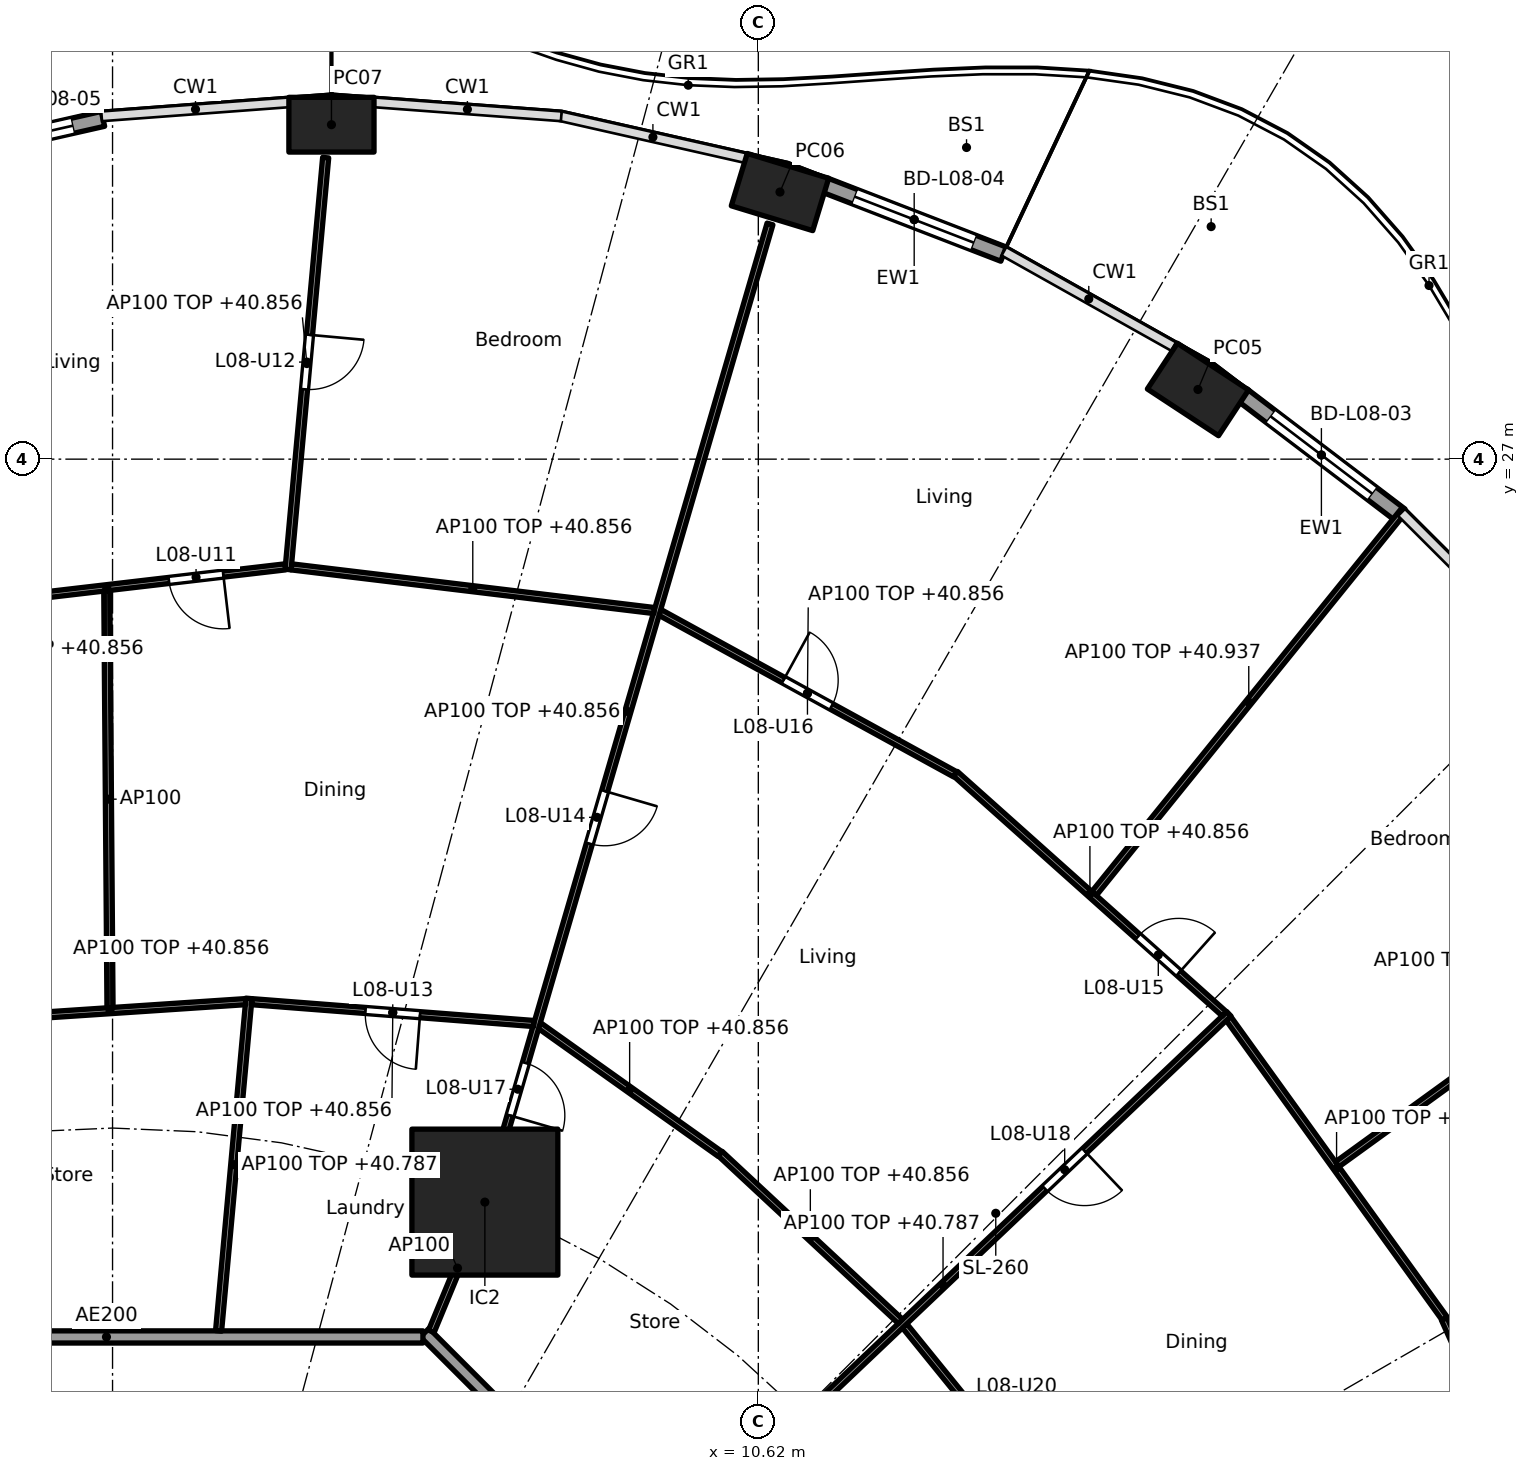
"""IFC4 building model, lengths in metres.
Left out: names, types, materials, properties, quantities, classifications, styles, units other than length and angle.
Written with IfcOpenShell. Run it as: python <this file> out.ifc"""

import sys

from ifc_helpers import new_model, si_unit, direction, frame, frame_2d, origin, origin_2d, place, context, subcontext, project, spatial, rectangle, hollow_rectangle, extrude, element, fill, save


model = new_model("IFC4")
c1 = context("Model", 3, precision=1e-05, world=origin(), true_north=direction((0.0, 1.0)))
c2 = subcontext(c1, "Body", "Model", "MODEL_VIEW")
j1 = project(units=[si_unit("LENGTHUNIT", "METRE"), si_unit("PLANEANGLEUNIT", "RADIAN")], contexts=[c1])
p1 = place(None, origin())
s1 = spatial("IfcSite", under=j1, at=p1, CompositionType="ELEMENT")
p2 = place(p1, origin())
s2 = spatial("IfcBuilding", under=s1, at=p2, CompositionType="ELEMENT")
p3 = place(p2, frame((0.0, 0.0, 38.1)))
s3 = spatial("IfcBuildingStorey", under=s2, at=p3, CompositionType="ELEMENT", Elevation=38.1)
for number, where, z_axis, x_axis in (
    (1, (17.85, 28.146, 0.0), (0.0, 0.0, 1.0), (-0.836, 0.549, 0.0)),
    (2, (10.976, 31.393, 0.0), (0.0, 0.0, 1.0), (-0.957, 0.292, 0.0)),
    (3, (3.6, 32.5, 0.0), (0.0, 0.0, 1.0), (-1.0, 0.0, 0.0)),
):
    element("IfcColumn", number, at=place(p3, frame(where, z_axis=z_axis, x_axis=x_axis)), inside=s3, PredefinedType="COLUMN", context=c2, shape_type="SweptSolid", body=[
        extrude(hollow_rectangle(XDim=1.4, YDim=0.9, WallThickness=0.05, at=origin_2d()), origin(), (0.0, 0.0, 1.0), 3.7),
    ])
p4 = place(p3, frame((6.123, 14.782, 0.0), z_axis=(0.0, 0.0, 1.0), x_axis=(1.0, 0.0, 0.0)))
e4 = element("IfcColumn", 4, at=p4, inside=s3, PredefinedType="COLUMN", context=c2, shape_type="SweptSolid", body=[
    extrude(rectangle(XDim=2.4, YDim=2.4, at=origin_2d()), origin(), (0.0, 0.0, 1.0), 3.7),
])
p5 = place(p3, frame((18.582, 28.056, 0.0), z_axis=(0.0, 0.0, 1.0), x_axis=(0.796022293214, -0.605267303517, 0.0)))
e5 = element("IfcWall", 5, at=p5, inside=s3, PredefinedType="SOLIDWALL", context=c2, shape_type="SweptSolid", body=[
    extrude(rectangle(XDim=3.262, YDim=0.25, at=frame_2d((1.631, 0.0))), origin(), (0.0, 0.0, 1.0), 3.44),
])
p6 = place(p5, frame((0.581, 0.0, 0.0)))
e6 = element("IfcOpeningElement", 6, at=p6, cuts=e5, PredefinedType="OPENING", context=c2, shape_type="SweptSolid", body=[
    extrude(rectangle(XDim=2.1, YDim=2.4, at=frame_2d((1.05, 1.2))), frame((0.0, 0.135, 0.0), z_axis=(0.0, -1.0, 0.0), x_axis=(1.0, 0.0, 0.0)), (0.0, 0.0, 1.0), 0.27),
])
p7 = place(p3, frame((11.714, 31.507, 0.0), z_axis=(0.0, 0.0, 1.0), x_axis=(0.932809381943, -0.360370166577, 0.0)))
e7 = element("IfcWall", 7, at=p7, inside=s3, PredefinedType="SOLIDWALL", context=c2, shape_type="SweptSolid", body=[
    extrude(rectangle(XDim=3.151, YDim=0.25, at=frame_2d((1.575, 0.0))), origin(), (0.0, 0.0, 1.0), 3.44),
])
p8 = place(p7, frame((0.525, 0.0, 0.0)))
e8 = element("IfcOpeningElement", 8, at=p8, cuts=e7, PredefinedType="OPENING", context=c2, shape_type="SweptSolid", body=[
    extrude(rectangle(XDim=2.1, YDim=2.4, at=frame_2d((1.05, 1.2))), frame((0.0, 0.135, 0.0), z_axis=(0.0, -1.0, 0.0), x_axis=(1.0, 0.0, 0.0)), (0.0, 0.0, 1.0), 0.27),
])
p9 = place(p3, frame((-3.195, 31.908, 0.0), z_axis=(0.0, 0.0, 1.0), x_axis=(0.975331134677, 0.220746863466, 0.0)))
e9 = element("IfcWall", 9, at=p9, inside=s3, PredefinedType="SOLIDWALL", context=c2, shape_type="SweptSolid", body=[
    extrude(rectangle(XDim=3.115, YDim=0.25, at=frame_2d((1.557, 0.0))), origin(), (0.0, 0.0, 1.0), 3.44),
])
p10 = place(p9, frame((0.507, 0.0, 0.0)))
e10 = element("IfcOpeningElement", 10, at=p10, cuts=e9, PredefinedType="OPENING", context=c2, shape_type="SweptSolid", body=[
    extrude(rectangle(XDim=2.1, YDim=2.4, at=frame_2d((1.05, 1.2))), frame((0.0, 0.135, 0.0), z_axis=(0.0, -1.0, 0.0), x_axis=(1.0, 0.0, 0.0)), (0.0, 0.0, 1.0), 0.27),
])
p11 = place(p3, frame((12.635, 5.134, 0.0), z_axis=(0.0, 0.0, 1.0), x_axis=(-0.707106781187, 0.707106781187, 0.0)))
e11 = element("IfcWall", 11, at=p11, inside=s3, PredefinedType="PARTITIONING", context=c2, shape_type="SweptSolid", body=[
    extrude(rectangle(XDim=10.609, YDim=0.2, at=frame_2d((5.305, 0.0))), origin(), (0.0, 0.0, 1.0), 3.44),
])
p12 = place(p3, frame((5.104, 12.565, 0.0), z_axis=(0.0, 0.0, 1.0), x_axis=(-1.0, 0.0, 0.0)))
e12 = element("IfcWall", 12, at=p12, inside=s3, PredefinedType="PARTITIONING", context=c2, shape_type="SweptSolid", body=[
    extrude(rectangle(XDim=10.409, YDim=0.2, at=frame_2d((5.205, 0.0))), origin(), (0.0, 0.0, 1.0), 3.44),
])
p13 = place(p3, frame((24.273, 7.584, 0.0), z_axis=(0.0, 0.0, 1.0), x_axis=(-0.410201529109, 0.911994904326, 0.0)))
e13 = element("IfcWall", 13, at=p13, inside=s3, PredefinedType="PARTITIONING", context=c2, shape_type="SweptSolid", body=[
    extrude(rectangle(XDim=5.787, YDim=0.1, at=frame_2d((2.894, 0.0))), origin(), (0.0, 0.0, 1.0), 2.756),
])
p14 = place(p13, frame((2.444, 0.0, 0.0)))
e14 = element("IfcOpeningElement", 14, at=p14, cuts=e13, PredefinedType="OPENING", context=c2, shape_type="SweptSolid", body=[
    extrude(rectangle(XDim=0.9, YDim=2.1, at=frame_2d((0.45, 1.05))), frame((0.0, 0.06, 0.0), z_axis=(0.0, -1.0, 0.0), x_axis=(1.0, 0.0, 0.0)), (0.0, 0.0, 1.0), 0.12),
])
p15 = place(p3, frame((15.614, 9.559, 0.0), z_axis=(0.0, 0.0, 1.0), x_axis=(-0.63012473344, 0.776493928056, 0.0)))
e15 = element("IfcWall", 15, at=p15, inside=s3, PredefinedType="PARTITIONING", context=c2, shape_type="SweptSolid", body=[
    extrude(rectangle(XDim=4.106, YDim=0.1, at=frame_2d((2.053, 0.0))), origin(), (0.0, 0.0, 1.0), 2.756),
])
p16 = place(p15, frame((1.628, 0.0, 0.0)))
e16 = element("IfcOpeningElement", 16, at=p16, cuts=e15, PredefinedType="OPENING", context=c2, shape_type="SweptSolid", body=[
    extrude(rectangle(XDim=0.9, YDim=2.1, at=frame_2d((0.45, 1.05))), frame((0.0, 0.06, 0.0), z_axis=(0.0, -1.0, 0.0), x_axis=(1.0, 0.0, 0.0)), (0.0, 0.0, 1.0), 0.12),
])
p17 = place(p3, frame((21.908, 12.866, 0.0), z_axis=(0.0, 0.0, 1.0), x_axis=(-0.584558392935, 0.811351640936, 0.0)))
e17 = element("IfcWall", 17, at=p17, inside=s3, PredefinedType="PARTITIONING", context=c2, shape_type="SweptSolid", body=[
    extrude(rectangle(XDim=6.084, YDim=0.1, at=frame_2d((3.042, 0.0))), origin(), (0.0, 0.0, 1.0), 2.756),
])
p18 = place(p3, frame((20.141, 15.405, 0.0), z_axis=(0.0, 0.0, 1.0), x_axis=(0.809834895779, 0.58665785734, 0.0)))
e18 = element("IfcWall", 18, at=p18, inside=s3, PredefinedType="PARTITIONING", context=c2, shape_type="SweptSolid", body=[
    extrude(rectangle(XDim=7.945, YDim=0.1, at=frame_2d((3.973, 0.0))), origin(), (0.0, 0.0, 1.0), 2.837),
])
p19 = place(p3, frame((8.957, 8.953, 0.0), z_axis=(0.0, 0.0, 1.0), x_axis=(0.725250022034, 0.688485588476, 0.0)))
e19 = element("IfcWall", 19, at=p19, inside=s3, PredefinedType="PARTITIONING", context=c2, shape_type="SweptSolid", body=[
    extrude(rectangle(XDim=12.963, YDim=0.1, at=frame_2d((6.481, 0.0))), origin(), (0.0, 0.0, 1.0), 2.687),
])
p20 = place(p19, frame((8.79, 0.0, 0.0)))
e20 = element("IfcOpeningElement", 20, at=p20, cuts=e19, PredefinedType="OPENING", context=c2, shape_type="SweptSolid", body=[
    extrude(rectangle(XDim=0.9, YDim=2.1, at=frame_2d((0.45, 1.05))), frame((0.0, 0.06, 0.0), z_axis=(0.0, -1.0, 0.0), x_axis=(1.0, 0.0, 0.0)), (0.0, 0.0, 1.0), 0.12),
])
p21 = place(p3, frame((12.958, 12.82, 0.0), z_axis=(0.0, 0.0, 1.0), x_axis=(-0.732028724098, 0.681273768096, 0.0)))
e21 = element("IfcWall", 21, at=p21, inside=s3, PredefinedType="PARTITIONING", context=c2, shape_type="SweptSolid", body=[
    extrude(rectangle(XDim=4.05, YDim=0.1, at=frame_2d((2.025, 0.0))), origin(), (0.0, 0.0, 1.0), 2.756),
])
p22 = place(p3, frame((18.285, 17.877, 0.0), z_axis=(0.0, 0.0, 1.0), x_axis=(-0.745812746724, 0.666155647596, 0.0)))
e22 = element("IfcWall", 22, at=p22, inside=s3, PredefinedType="PARTITIONING", context=c2, shape_type="SweptSolid", body=[
    extrude(rectangle(XDim=5.931, YDim=0.1, at=frame_2d((2.965, 0.0))), origin(), (0.0, 0.0, 1.0), 2.756),
])
p23 = place(p22, frame((1.008, 0.0, 0.0)))
e23 = element("IfcOpeningElement", 23, at=p23, cuts=e22, PredefinedType="OPENING", context=c2, shape_type="SweptSolid", body=[
    extrude(rectangle(XDim=0.9, YDim=2.1, at=frame_2d((0.45, 1.05))), frame((0.0, 0.06, 0.0), z_axis=(0.0, -1.0, 0.0), x_axis=(1.0, 0.0, 0.0)), (0.0, 0.0, 1.0), 0.12),
])
p24 = place(p3, frame((16.142, 19.858, 0.0), z_axis=(0.0, 0.0, 1.0), x_axis=(0.628738066508, 0.777617157555, 0.0)))
e24 = element("IfcWall", 24, at=p24, inside=s3, PredefinedType="PARTITIONING", context=c2, shape_type="SweptSolid", body=[
    extrude(rectangle(XDim=8.091, YDim=0.1, at=frame_2d((4.045, 0.0))), origin(), (0.0, 0.0, 1.0), 2.837),
])
p25 = place(p3, frame((9.989, 15.574, 0.0), z_axis=(0.0, 0.0, 1.0), x_axis=(-0.81494477814, 0.57953861699, 0.0)))
e25 = element("IfcWall", 25, at=p25, inside=s3, PredefinedType="PARTITIONING", context=c2, shape_type="SweptSolid", body=[
    extrude(rectangle(XDim=3.644, YDim=0.1, at=frame_2d((1.822, 0.0))), origin(), (0.0, 0.0, 1.0), 2.756),
])
p26 = place(p3, frame((13.855, 21.818, 0.0), z_axis=(0.0, 0.0, 1.0), x_axis=(-0.876794415294, 0.480865421203, 0.0)))
e26 = element("IfcWall", 26, at=p26, inside=s3, PredefinedType="PARTITIONING", context=c2, shape_type="SweptSolid", body=[
    extrude(rectangle(XDim=5.536, YDim=0.1, at=frame_2d((2.768, 0.0))), origin(), (0.0, 0.0, 1.0), 2.756),
])
p27 = place(p26, frame((2.318, 0.0, 0.0)))
e27 = element("IfcOpeningElement", 27, at=p27, cuts=e26, PredefinedType="OPENING", context=c2, shape_type="SweptSolid", body=[
    extrude(rectangle(XDim=0.9, YDim=2.1, at=frame_2d((0.45, 1.05))), frame((0.0, 0.06, 0.0), z_axis=(0.0, -1.0, 0.0), x_axis=(1.0, 0.0, 0.0)), (0.0, 0.0, 1.0), 0.12),
])
p28 = place(p3, frame((5.243, 12.657, 0.0), z_axis=(0.0, 0.0, 1.0), x_axis=(0.382719158442, 0.923864733477, 0.0)))
e28 = element("IfcWall", 28, at=p28, inside=s3, PredefinedType="PARTITIONING", context=c2, shape_type="SweptSolid", body=[
    extrude(rectangle(XDim=2.25, YDim=0.1, at=frame_2d((1.125, 0.0))), origin(), (0.0, 0.0, 1.0), 3.44),
])
p29 = place(p3, frame((6.137, 14.83, 0.0), z_axis=(0.0, 0.0, 1.0), x_axis=(0.27985745069, 0.960041565399, 0.0)))
e29 = element("IfcWall", 29, at=p29, inside=s3, PredefinedType="PARTITIONING", context=c2, shape_type="SweptSolid", body=[
    extrude(rectangle(XDim=16.705, YDim=0.1, at=frame_2d((8.353, 0.0))), origin(), (0.0, 0.0, 1.0), 2.756),
])
p30 = place(p29, frame((6.091, 0.0, 0.0)))
e30 = element("IfcOpeningElement", 30, at=p30, cuts=e29, PredefinedType="OPENING", context=c2, shape_type="SweptSolid", body=[
    extrude(rectangle(XDim=0.9, YDim=2.1, at=frame_2d((0.45, 1.05))), frame((0.0, 0.06, 0.0), z_axis=(0.0, -1.0, 0.0), x_axis=(1.0, 0.0, 0.0)), (0.0, 0.0, 1.0), 0.12),
])
p31 = place(p29, frame((1.434, 0.0, 0.0)))
e31 = element("IfcOpeningElement", 31, at=p31, cuts=e29, PredefinedType="OPENING", context=c2, shape_type="SweptSolid", body=[
    extrude(rectangle(XDim=0.9, YDim=2.1, at=frame_2d((0.45, 1.05))), frame((0.0, 0.06, 0.0), z_axis=(0.0, -1.0, 0.0), x_axis=(1.0, 0.0, 0.0)), (0.0, 0.0, 1.0), 0.12),
])
p32 = place(p3, frame((6.928, 17.719, 0.0), z_axis=(0.0, 0.0, 1.0), x_axis=(-0.997017959142, 0.077169872028, 0.0)))
e32 = element("IfcWall", 32, at=p32, inside=s3, PredefinedType="PARTITIONING", context=c2, shape_type="SweptSolid", body=[
    extrude(rectangle(XDim=4.654, YDim=0.1, at=frame_2d((2.327, 0.0))), origin(), (0.0, 0.0, 1.0), 2.756),
])
p33 = place(p32, frame((1.877, 0.0, 0.0)))
e33 = element("IfcOpeningElement", 33, at=p33, cuts=e32, PredefinedType="OPENING", context=c2, shape_type="SweptSolid", body=[
    extrude(rectangle(XDim=0.9, YDim=2.1, at=frame_2d((0.45, 1.05))), frame((0.0, 0.06, 0.0), z_axis=(0.0, -1.0, 0.0), x_axis=(1.0, 0.0, 0.0)), (0.0, 0.0, 1.0), 0.12),
])
p34 = place(p3, frame((8.907, 24.51, 0.0), z_axis=(0.0, 0.0, 1.0), x_axis=(-0.992836798252, 0.119478416615, 0.0)))
e34 = element("IfcWall", 34, at=p34, inside=s3, PredefinedType="PARTITIONING", context=c2, shape_type="SweptSolid", body=[
    extrude(rectangle(XDim=6.01, YDim=0.1, at=frame_2d((3.005, 0.0))), origin(), (0.0, 0.0, 1.0), 2.756),
])
p35 = place(p3, frame((1.744, 12.664, 0.0), z_axis=(0.0, 0.0, 1.0), x_axis=(0.090888552747, 0.995861070119, 0.0)))
e35 = element("IfcWall", 35, at=p35, inside=s3, PredefinedType="PARTITIONING", context=c2, shape_type="SweptSolid", body=[
    extrude(rectangle(XDim=5.49, YDim=0.1, at=frame_2d((2.745, 0.0))), origin(), (0.0, 0.0, 1.0), 2.687),
])
p36 = place(p3, frame((2.188, 18.079, 0.0), z_axis=(0.0, 0.0, 1.0), x_axis=(-0.997791437766, -0.066424744789, 0.0)))
e36 = element("IfcWall", 36, at=p36, inside=s3, PredefinedType="PARTITIONING", context=c2, shape_type="SweptSolid", body=[
    extrude(rectangle(XDim=4.469, YDim=0.1, at=frame_2d((2.235, 0.0))), origin(), (0.0, 0.0, 1.0), 2.756),
])
p37 = place(p3, frame((2.887, 25.185, 0.0), z_axis=(0.0, 0.0, 1.0), x_axis=(0.090885272046, 0.995861369531, 0.0)))
e37 = element("IfcWall", 37, at=p37, inside=s3, PredefinedType="PARTITIONING", context=c2, shape_type="SweptSolid", body=[
    extrude(rectangle(XDim=6.802, YDim=0.1, at=frame_2d((3.401, 0.0))), origin(), (0.0, 0.0, 1.0), 2.756),
])
p38 = place(p37, frame((2.976, 0.0, 0.0)))
e38 = element("IfcOpeningElement", 38, at=p38, cuts=e37, PredefinedType="OPENING", context=c2, shape_type="SweptSolid", body=[
    extrude(rectangle(XDim=0.9, YDim=2.1, at=frame_2d((0.45, 1.05))), frame((0.0, 0.06, 0.0), z_axis=(0.0, -1.0, 0.0), x_axis=(1.0, 0.0, 0.0)), (0.0, 0.0, 1.0), 0.12),
])
p39 = place(p3, frame((2.842, 25.229, 0.0), z_axis=(0.0, 0.0, 1.0), x_axis=(-0.993255612046, -0.115945198862, 0.0)))
e39 = element("IfcWall", 39, at=p39, inside=s3, PredefinedType="PARTITIONING", context=c2, shape_type="SweptSolid", body=[
    extrude(rectangle(XDim=5.913, YDim=0.1, at=frame_2d((2.956, 0.0))), origin(), (0.0, 0.0, 1.0), 2.756),
])
p40 = place(p39, frame((1.028, 0.0, 0.0)))
e40 = element("IfcOpeningElement", 40, at=p40, cuts=e39, PredefinedType="OPENING", context=c2, shape_type="SweptSolid", body=[
    extrude(rectangle(XDim=0.9, YDim=2.1, at=frame_2d((0.45, 1.05))), frame((0.0, 0.06, 0.0), z_axis=(0.0, -1.0, 0.0), x_axis=(1.0, 0.0, 0.0)), (0.0, 0.0, 1.0), 0.12),
])
p41 = place(p3, frame((-0.042, 17.98, 0.0), z_axis=(0.0, 0.0, 1.0), x_axis=(-0.007692080119, 0.999970415514, 0.0)))
e41 = element("IfcWall", 41, at=p41, inside=s3, PredefinedType="PARTITIONING", context=c2, shape_type="SweptSolid", body=[
    extrude(rectangle(XDim=6.856, YDim=0.1, at=frame_2d((3.428, 0.0))), origin(), (0.0, 0.0, 1.0), 3.44),
])
p42 = place(p6, origin())
e42 = element("IfcDoor", 42, at=p42, inside=s3, OperationType="SLIDING_TO_LEFT", PredefinedType="DOOR", context=c2, shape_type="SweptSolid", body=[
    extrude(rectangle(XDim=2.1, YDim=2.4, at=frame_2d((1.05, 1.2))), frame((0.0, 0.025, 0.0), z_axis=(0.0, -1.0, 0.0), x_axis=(1.0, 0.0, 0.0)), (0.0, 0.0, 1.0), 0.05),
])
fill(e6, e42)
p43 = place(p8, origin())
e43 = element("IfcDoor", 43, at=p43, inside=s3, OperationType="SLIDING_TO_LEFT", PredefinedType="DOOR", context=c2, shape_type="SweptSolid", body=[
    extrude(rectangle(XDim=2.1, YDim=2.4, at=frame_2d((1.05, 1.2))), frame((0.0, 0.025, 0.0), z_axis=(0.0, -1.0, 0.0), x_axis=(1.0, 0.0, 0.0)), (0.0, 0.0, 1.0), 0.05),
])
fill(e8, e43)
p44 = place(p10, origin())
e44 = element("IfcDoor", 44, at=p44, inside=s3, OperationType="SLIDING_TO_LEFT", PredefinedType="DOOR", context=c2, shape_type="SweptSolid", body=[
    extrude(rectangle(XDim=2.1, YDim=2.4, at=frame_2d((1.05, 1.2))), frame((0.0, 0.025, 0.0), z_axis=(0.0, -1.0, 0.0), x_axis=(1.0, 0.0, 0.0)), (0.0, 0.0, 1.0), 0.05),
])
fill(e10, e44)
p45 = place(p40, origin())
e45 = element("IfcDoor", 45, at=p45, inside=s3, OperationType="SINGLE_SWING_LEFT", PredefinedType="DOOR", context=c2, shape_type="SweptSolid", body=[
    extrude(rectangle(XDim=0.9, YDim=2.1, at=frame_2d((0.45, 1.05))), frame((0.0, 0.025, 0.0), z_axis=(0.0, -1.0, 0.0), x_axis=(1.0, 0.0, 0.0)), (0.0, 0.0, 1.0), 0.05),
])
fill(e40, e45)
p46 = place(p38, frame((0.9, 0.0, 0.0), x_axis=(-1.0, 0.0, 0.0)))
e46 = element("IfcDoor", 46, at=p46, inside=s3, OperationType="SINGLE_SWING_LEFT", PredefinedType="DOOR", context=c2, shape_type="SweptSolid", body=[
    extrude(rectangle(XDim=0.9, YDim=2.1, at=frame_2d((0.45, 1.05))), frame((0.0, 0.025, 0.0), z_axis=(0.0, -1.0, 0.0), x_axis=(1.0, 0.0, 0.0)), (0.0, 0.0, 1.0), 0.05),
])
fill(e38, e46)
p47 = place(p33, origin())
e47 = element("IfcDoor", 47, at=p47, inside=s3, OperationType="SINGLE_SWING_LEFT", PredefinedType="DOOR", context=c2, shape_type="SweptSolid", body=[
    extrude(rectangle(XDim=0.9, YDim=2.1, at=frame_2d((0.45, 1.05))), frame((0.0, 0.025, 0.0), z_axis=(0.0, -1.0, 0.0), x_axis=(1.0, 0.0, 0.0)), (0.0, 0.0, 1.0), 0.05),
])
fill(e33, e47)
p48 = place(p30, frame((0.9, 0.0, 0.0), x_axis=(-1.0, 0.0, 0.0)))
e48 = element("IfcDoor", 48, at=p48, inside=s3, OperationType="SINGLE_SWING_LEFT", PredefinedType="DOOR", context=c2, shape_type="SweptSolid", body=[
    extrude(rectangle(XDim=0.9, YDim=2.1, at=frame_2d((0.45, 1.05))), frame((0.0, 0.025, 0.0), z_axis=(0.0, -1.0, 0.0), x_axis=(1.0, 0.0, 0.0)), (0.0, 0.0, 1.0), 0.05),
])
fill(e30, e48)
p49 = place(p23, frame((0.9, 0.0, 0.0), x_axis=(-1.0, 0.0, 0.0)))
e49 = element("IfcDoor", 49, at=p49, inside=s3, OperationType="SINGLE_SWING_RIGHT", PredefinedType="DOOR", context=c2, shape_type="SweptSolid", body=[
    extrude(rectangle(XDim=0.9, YDim=2.1, at=frame_2d((0.45, 1.05))), frame((0.0, 0.025, 0.0), z_axis=(0.0, -1.0, 0.0), x_axis=(1.0, 0.0, 0.0)), (0.0, 0.0, 1.0), 0.05),
])
fill(e23, e49)
p50 = place(p27, frame((0.9, 0.0, 0.0), x_axis=(-1.0, 0.0, 0.0)))
e50 = element("IfcDoor", 50, at=p50, inside=s3, OperationType="SINGLE_SWING_LEFT", PredefinedType="DOOR", context=c2, shape_type="SweptSolid", body=[
    extrude(rectangle(XDim=0.9, YDim=2.1, at=frame_2d((0.45, 1.05))), frame((0.0, 0.025, 0.0), z_axis=(0.0, -1.0, 0.0), x_axis=(1.0, 0.0, 0.0)), (0.0, 0.0, 1.0), 0.05),
])
fill(e27, e50)
p51 = place(p31, frame((0.9, 0.0, 0.0), x_axis=(-1.0, 0.0, 0.0)))
e51 = element("IfcDoor", 51, at=p51, inside=s3, OperationType="SINGLE_SWING_RIGHT", PredefinedType="DOOR", context=c2, shape_type="SweptSolid", body=[
    extrude(rectangle(XDim=0.9, YDim=2.1, at=frame_2d((0.45, 1.05))), frame((0.0, 0.025, 0.0), z_axis=(0.0, -1.0, 0.0), x_axis=(1.0, 0.0, 0.0)), (0.0, 0.0, 1.0), 0.05),
])
fill(e31, e51)
p52 = place(p20, frame((0.9, 0.0, 0.0), x_axis=(-1.0, 0.0, 0.0)))
e52 = element("IfcDoor", 52, at=p52, inside=s3, OperationType="SINGLE_SWING_LEFT", PredefinedType="DOOR", context=c2, shape_type="SweptSolid", body=[
    extrude(rectangle(XDim=0.9, YDim=2.1, at=frame_2d((0.45, 1.05))), frame((0.0, 0.025, 0.0), z_axis=(0.0, -1.0, 0.0), x_axis=(1.0, 0.0, 0.0)), (0.0, 0.0, 1.0), 0.05),
])
fill(e20, e52)
save(model, sys.argv[1])
